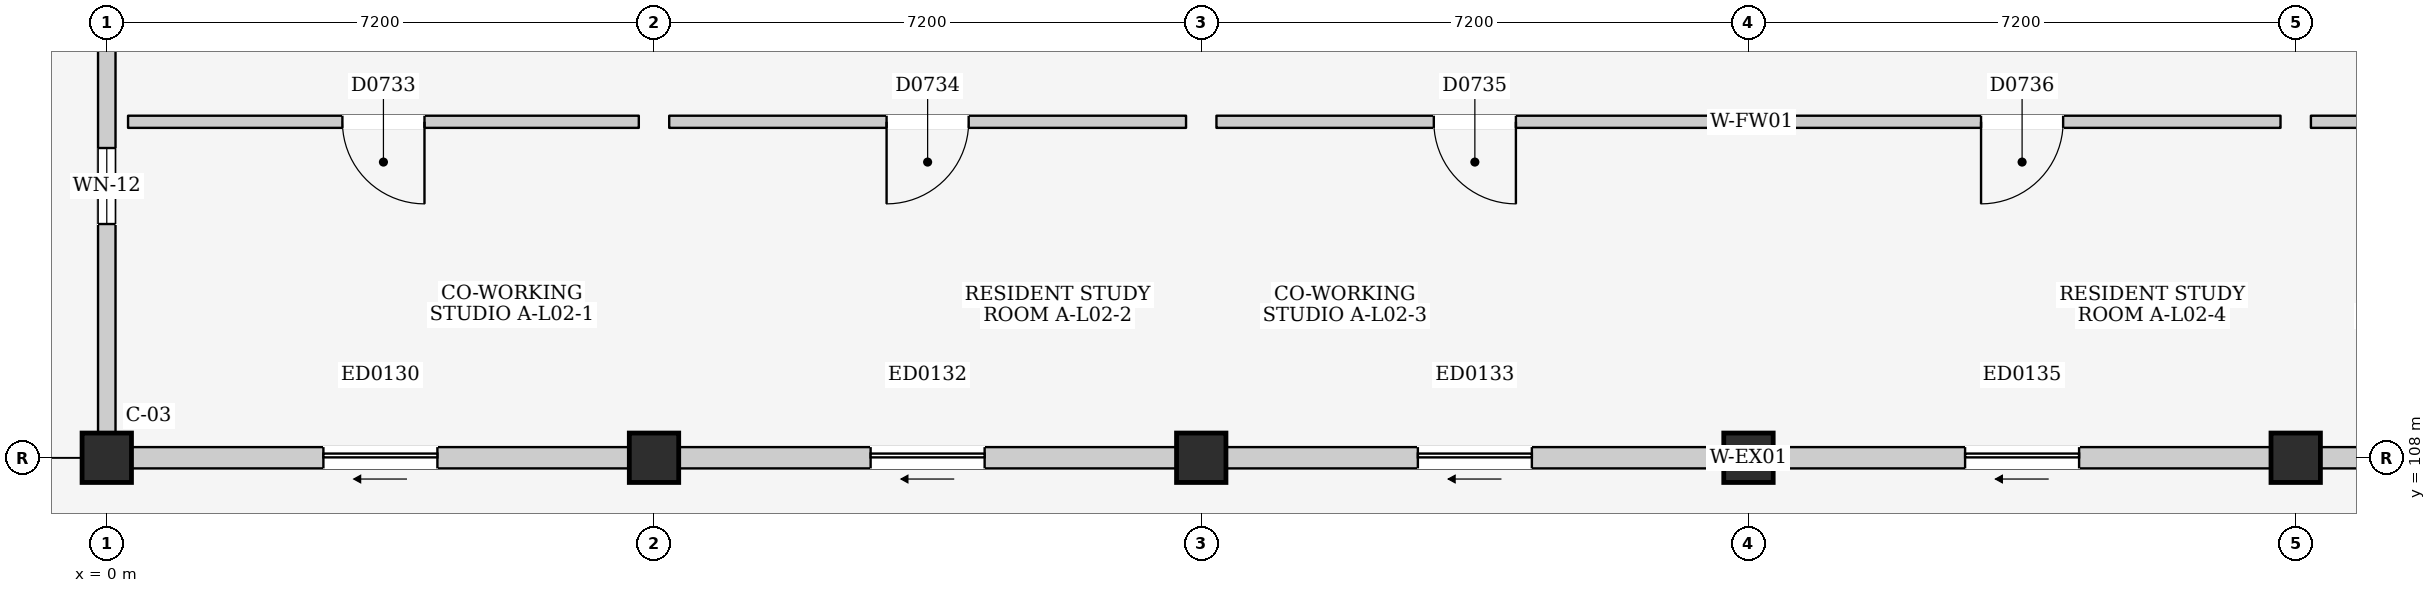
"""IFC4 building model, lengths in metres.
Left out: names, types, materials, properties, quantities, classifications, styles, units other than length and angle.
Written with IfcOpenShell. Run it as: python <this file> out.ifc"""

import sys

from ifc_helpers import new_model, si_unit, direction, frame, frame_2d, origin, origin_2d, place, context, subcontext, project, spatial, rectangle, extrude, element, fill, save


model = new_model("IFC4")
c1 = context("Model", 3, precision=1e-05, world=origin(), true_north=direction((0.0, 1.0)))
c2 = subcontext(c1, "Body", "Model", "MODEL_VIEW")
j1 = project(units=[si_unit("LENGTHUNIT", "METRE"), si_unit("PLANEANGLEUNIT", "RADIAN")], contexts=[c1])
p1 = place(None, origin())
s1 = spatial("IfcSite", under=j1, at=p1, CompositionType="ELEMENT")
p2 = place(p1, origin())
s2 = spatial("IfcBuilding", under=s1, at=p2, CompositionType="ELEMENT")
p3 = place(p2, frame((0.0, 0.0, 9.0)))
s3 = spatial("IfcBuildingStorey", under=s2, at=p3, CompositionType="ELEMENT", Elevation=9.0)
for number, where, z_axis, x_axis in (
    (1, (0.0, 108.0, 0.0), (0.0, 0.0, 1.0), (1.0, 0.0, 0.0)),
    (2, (7.2, 108.0, 0.0), (0.0, 0.0, 1.0), (1.0, 0.0, 0.0)),
    (3, (14.4, 108.0, 0.0), (0.0, 0.0, 1.0), (1.0, 0.0, 0.0)),
    (4, (21.6, 108.0, 0.0), (0.0, 0.0, 1.0), (1.0, 0.0, 0.0)),
    (5, (28.8, 108.0, 0.0), (0.0, 0.0, 1.0), (1.0, 0.0, 0.0)),
):
    element("IfcColumn", number, at=place(p3, frame(where, z_axis=z_axis, x_axis=x_axis)), inside=s3, PredefinedType="COLUMN", context=c2, shape_type="SweptSolid", body=[
        extrude(rectangle(XDim=0.65, YDim=0.65, at=origin_2d()), origin(), (0.0, 0.0, 1.0), 3.2),
    ])
p4 = place(p3, frame((0.325, 108.0, 0.0), z_axis=(0.0, 0.0, 1.0), x_axis=(1.0, 0.0, 0.0)))
e6 = element("IfcWall", 6, at=p4, inside=s3, PredefinedType="ELEMENTEDWALL", context=c2, shape_type="SweptSolid", body=[
    extrude(rectangle(XDim=6.55, YDim=0.28, at=frame_2d((3.275, 0.0))), origin(), (0.0, 0.0, 1.0), 2.295),
])
p5 = place(p4, frame((2.525, 0.0, 0.0)))
e7 = element("IfcOpeningElement", 7, at=p5, cuts=e6, PredefinedType="OPENING", context=c2, shape_type="SweptSolid", body=[
    extrude(rectangle(XDim=1.5, YDim=2.12, at=frame_2d((0.75, 1.06))), frame((0.0, 0.155, 0.0), z_axis=(0.0, -1.0, 0.0), x_axis=(1.0, 0.0, 0.0)), (0.0, 0.0, 1.0), 0.31),
])
p6 = place(p3, frame((7.525, 108.0, 0.0), z_axis=(0.0, 0.0, 1.0), x_axis=(1.0, 0.0, 0.0)))
e8 = element("IfcWall", 8, at=p6, inside=s3, PredefinedType="ELEMENTEDWALL", context=c2, shape_type="SweptSolid", body=[
    extrude(rectangle(XDim=6.55, YDim=0.28, at=frame_2d((3.275, 0.0))), origin(), (0.0, 0.0, 1.0), 2.295),
])
p7 = place(p6, frame((2.525, 0.0, 0.0)))
e9 = element("IfcOpeningElement", 9, at=p7, cuts=e8, PredefinedType="OPENING", context=c2, shape_type="SweptSolid", body=[
    extrude(rectangle(XDim=1.5, YDim=2.12, at=frame_2d((0.75, 1.06))), frame((0.0, 0.155, 0.0), z_axis=(0.0, -1.0, 0.0), x_axis=(1.0, 0.0, 0.0)), (0.0, 0.0, 1.0), 0.31),
])
p8 = place(p3, frame((14.725, 108.0, 0.0), z_axis=(0.0, 0.0, 1.0), x_axis=(1.0, 0.0, 0.0)))
e10 = element("IfcWall", 10, at=p8, inside=s3, PredefinedType="ELEMENTEDWALL", context=c2, shape_type="SweptSolid", body=[
    extrude(rectangle(XDim=6.55, YDim=0.28, at=frame_2d((3.275, 0.0))), origin(), (0.0, 0.0, 1.0), 2.295),
])
p9 = place(p8, frame((2.525, 0.0, 0.0)))
e11 = element("IfcOpeningElement", 11, at=p9, cuts=e10, PredefinedType="OPENING", context=c2, shape_type="SweptSolid", body=[
    extrude(rectangle(XDim=1.5, YDim=2.12, at=frame_2d((0.75, 1.06))), frame((0.0, 0.155, 0.0), z_axis=(0.0, -1.0, 0.0), x_axis=(1.0, 0.0, 0.0)), (0.0, 0.0, 1.0), 0.31),
])
p10 = place(p3, frame((21.925, 108.0, 0.0), z_axis=(0.0, 0.0, 1.0), x_axis=(1.0, 0.0, 0.0)))
e12 = element("IfcWall", 12, at=p10, inside=s3, PredefinedType="ELEMENTEDWALL", context=c2, shape_type="SweptSolid", body=[
    extrude(rectangle(XDim=6.55, YDim=0.28, at=frame_2d((3.275, 0.0))), origin(), (0.0, 0.0, 1.0), 2.295),
])
p11 = place(p10, frame((2.525, 0.0, 0.0)))
e13 = element("IfcOpeningElement", 13, at=p11, cuts=e12, PredefinedType="OPENING", context=c2, shape_type="SweptSolid", body=[
    extrude(rectangle(XDim=1.5, YDim=2.12, at=frame_2d((0.75, 1.06))), frame((0.0, 0.155, 0.0), z_axis=(0.0, -1.0, 0.0), x_axis=(1.0, 0.0, 0.0)), (0.0, 0.0, 1.0), 0.31),
])
p12 = place(p3, frame((29.125, 108.0, 0.0), z_axis=(0.0, 0.0, 1.0), x_axis=(1.0, 0.0, 0.0)))
e14 = element("IfcWall", 14, at=p12, inside=s3, PredefinedType="ELEMENTEDWALL", context=c2, shape_type="SweptSolid", body=[
    extrude(rectangle(XDim=6.55, YDim=0.28, at=frame_2d((3.275, 0.0))), origin(), (0.0, 0.0, 1.0), 2.295),
])
p13 = place(p12, frame((2.525, 0.0, 0.0)))
e15 = element("IfcOpeningElement", 15, at=p13, cuts=e14, PredefinedType="OPENING", context=c2, shape_type="SweptSolid", body=[
    extrude(rectangle(XDim=1.5, YDim=2.12, at=frame_2d((0.75, 1.06))), frame((0.0, 0.155, 0.0), z_axis=(0.0, -1.0, 0.0), x_axis=(1.0, 0.0, 0.0)), (0.0, 0.0, 1.0), 0.31),
])
p14 = place(p3, frame((0.0, 108.325, 0.0), z_axis=(0.0, 0.0, 1.0), x_axis=(0.0, 1.0, 0.0)))
e16 = element("IfcWall", 16, at=p14, inside=s3, PredefinedType="ELEMENTEDWALL", context=c2, shape_type="SweptSolid", body=[
    extrude(rectangle(XDim=6.55, YDim=0.23, at=frame_2d((3.275, 0.0))), origin(), (0.0, 0.0, 1.0), 2.425),
])
p15 = place(p14, frame((2.75, 0.0, 1.1)))
e17 = element("IfcOpeningElement", 17, at=p15, cuts=e16, PredefinedType="OPENING", context=c2, shape_type="SweptSolid", body=[
    extrude(rectangle(XDim=1.0, YDim=0.9, at=frame_2d((0.5, 0.45))), frame((0.0, 0.13, 0.0), z_axis=(0.0, -1.0, 0.0), x_axis=(1.0, 0.0, 0.0)), (0.0, 0.0, 1.0), 0.26),
])
p16 = place(p3, frame((0.28, 112.42, 0.0), z_axis=(0.0, 0.0, 1.0), x_axis=(1.0, 0.0, 0.0)))
e18 = element("IfcWall", 18, at=p16, inside=s3, PredefinedType="PARTITIONING", context=c2, shape_type="SweptSolid", body=[
    extrude(rectangle(XDim=6.72, YDim=0.16, at=frame_2d((3.36, 0.0))), origin(), (0.0, 0.0, 1.0), 2.96),
])
p17 = place(p16, frame((2.82, 0.0, 0.0)))
e19 = element("IfcOpeningElement", 19, at=p17, cuts=e18, PredefinedType="OPENING", context=c2, shape_type="SweptSolid", body=[
    extrude(rectangle(XDim=1.08, YDim=2.22, at=frame_2d((0.54, 1.11))), frame((0.0, 0.095, 0.0), z_axis=(0.0, -1.0, 0.0), x_axis=(1.0, 0.0, 0.0)), (0.0, 0.0, 1.0), 0.19),
])
p18 = place(p3, frame((7.4, 112.42, 0.0), z_axis=(0.0, 0.0, 1.0), x_axis=(1.0, 0.0, 0.0)))
e20 = element("IfcWall", 20, at=p18, inside=s3, PredefinedType="PARTITIONING", context=c2, shape_type="SweptSolid", body=[
    extrude(rectangle(XDim=6.8, YDim=0.16, at=frame_2d((3.4, 0.0))), origin(), (0.0, 0.0, 1.0), 2.96),
])
p19 = place(p18, frame((2.86, 0.0, 0.0)))
e21 = element("IfcOpeningElement", 21, at=p19, cuts=e20, PredefinedType="OPENING", context=c2, shape_type="SweptSolid", body=[
    extrude(rectangle(XDim=1.08, YDim=2.22, at=frame_2d((0.54, 1.11))), frame((0.0, 0.095, 0.0), z_axis=(0.0, -1.0, 0.0), x_axis=(1.0, 0.0, 0.0)), (0.0, 0.0, 1.0), 0.19),
])
p20 = place(p3, frame((14.6, 112.42, 0.0), z_axis=(0.0, 0.0, 1.0), x_axis=(1.0, 0.0, 0.0)))
e22 = element("IfcWall", 22, at=p20, inside=s3, PredefinedType="PARTITIONING", context=c2, shape_type="SweptSolid", body=[
    extrude(rectangle(XDim=6.8, YDim=0.16, at=frame_2d((3.4, 0.0))), origin(), (0.0, 0.0, 1.0), 2.96),
])
p21 = place(p20, frame((2.86, 0.0, 0.0)))
e23 = element("IfcOpeningElement", 23, at=p21, cuts=e22, PredefinedType="OPENING", context=c2, shape_type="SweptSolid", body=[
    extrude(rectangle(XDim=1.08, YDim=2.22, at=frame_2d((0.54, 1.11))), frame((0.0, 0.095, 0.0), z_axis=(0.0, -1.0, 0.0), x_axis=(1.0, 0.0, 0.0)), (0.0, 0.0, 1.0), 0.19),
])
p22 = place(p3, frame((21.8, 112.42, 0.0), z_axis=(0.0, 0.0, 1.0), x_axis=(1.0, 0.0, 0.0)))
e24 = element("IfcWall", 24, at=p22, inside=s3, PredefinedType="PARTITIONING", context=c2, shape_type="SweptSolid", body=[
    extrude(rectangle(XDim=6.8, YDim=0.16, at=frame_2d((3.4, 0.0))), origin(), (0.0, 0.0, 1.0), 2.96),
])
p23 = place(p22, frame((2.86, 0.0, 0.0)))
e25 = element("IfcOpeningElement", 25, at=p23, cuts=e24, PredefinedType="OPENING", context=c2, shape_type="SweptSolid", body=[
    extrude(rectangle(XDim=1.08, YDim=2.22, at=frame_2d((0.54, 1.11))), frame((0.0, 0.095, 0.0), z_axis=(0.0, -1.0, 0.0), x_axis=(1.0, 0.0, 0.0)), (0.0, 0.0, 1.0), 0.19),
])
p24 = place(p3, frame((29.0, 112.42, 0.0), z_axis=(0.0, 0.0, 1.0), x_axis=(1.0, 0.0, 0.0)))
e26 = element("IfcWall", 26, at=p24, inside=s3, PredefinedType="PARTITIONING", context=c2, shape_type="SweptSolid", body=[
    extrude(rectangle(XDim=6.8, YDim=0.16, at=frame_2d((3.4, 0.0))), origin(), (0.0, 0.0, 1.0), 2.96),
])
p25 = place(p24, frame((2.86, 0.0, 0.0)))
e27 = element("IfcOpeningElement", 27, at=p25, cuts=e26, PredefinedType="OPENING", context=c2, shape_type="SweptSolid", body=[
    extrude(rectangle(XDim=1.08, YDim=2.22, at=frame_2d((0.54, 1.11))), frame((0.0, 0.095, 0.0), z_axis=(0.0, -1.0, 0.0), x_axis=(1.0, 0.0, 0.0)), (0.0, 0.0, 1.0), 0.19),
])
p26 = place(p5, frame((1.5, 0.0, 0.0), z_axis=(0.0, 0.0, 1.0), x_axis=(-1.0, 0.0, 0.0)))
e28 = element("IfcDoor", 28, at=p26, inside=s3, OperationType="SLIDING_TO_LEFT", PredefinedType="DOOR", context=c2, shape_type="SweptSolid", body=[
    extrude(rectangle(XDim=1.5, YDim=2.12, at=frame_2d((0.75, 1.06))), frame((0.0, 0.025, 0.0), z_axis=(0.0, -1.0, 0.0), x_axis=(1.0, 0.0, 0.0)), (0.0, 0.0, 1.0), 0.05),
])
fill(e7, e28)
p27 = place(p7, frame((1.5, 0.0, 0.0), z_axis=(0.0, 0.0, 1.0), x_axis=(-1.0, 0.0, 0.0)))
e29 = element("IfcDoor", 29, at=p27, inside=s3, OperationType="SLIDING_TO_LEFT", PredefinedType="DOOR", context=c2, shape_type="SweptSolid", body=[
    extrude(rectangle(XDim=1.5, YDim=2.12, at=frame_2d((0.75, 1.06))), frame((0.0, 0.025, 0.0), z_axis=(0.0, -1.0, 0.0), x_axis=(1.0, 0.0, 0.0)), (0.0, 0.0, 1.0), 0.05),
])
fill(e9, e29)
p28 = place(p9, frame((1.5, 0.0, 0.0), z_axis=(0.0, 0.0, 1.0), x_axis=(-1.0, 0.0, 0.0)))
e30 = element("IfcDoor", 30, at=p28, inside=s3, OperationType="SLIDING_TO_LEFT", PredefinedType="DOOR", context=c2, shape_type="SweptSolid", body=[
    extrude(rectangle(XDim=1.5, YDim=2.12, at=frame_2d((0.75, 1.06))), frame((0.0, 0.025, 0.0), z_axis=(0.0, -1.0, 0.0), x_axis=(1.0, 0.0, 0.0)), (0.0, 0.0, 1.0), 0.05),
])
fill(e11, e30)
p29 = place(p11, frame((1.5, 0.0, 0.0), z_axis=(0.0, 0.0, 1.0), x_axis=(-1.0, 0.0, 0.0)))
e31 = element("IfcDoor", 31, at=p29, inside=s3, OperationType="SLIDING_TO_LEFT", PredefinedType="DOOR", context=c2, shape_type="SweptSolid", body=[
    extrude(rectangle(XDim=1.5, YDim=2.12, at=frame_2d((0.75, 1.06))), frame((0.0, 0.025, 0.0), z_axis=(0.0, -1.0, 0.0), x_axis=(1.0, 0.0, 0.0)), (0.0, 0.0, 1.0), 0.05),
])
fill(e13, e31)
p30 = place(p15, origin())
e32 = element("IfcWindow", 32, at=p30, inside=s3, PartitioningType="SINGLE_PANEL", PredefinedType="WINDOW", context=c2, shape_type="SweptSolid", body=[
    extrude(rectangle(XDim=1.0, YDim=0.9, at=frame_2d((0.5, 0.45))), frame((0.0, 0.03, 0.0), z_axis=(0.0, -1.0, 0.0), x_axis=(1.0, 0.0, 0.0)), (0.0, 0.0, 1.0), 0.06),
])
fill(e17, e32)
p31 = place(p17, frame((1.08, 0.0, 0.0), z_axis=(0.0, 0.0, 1.0), x_axis=(-1.0, 0.0, 0.0)))
e33 = element("IfcDoor", 33, at=p31, inside=s3, OperationType="SINGLE_SWING_LEFT", PredefinedType="DOOR", context=c2, shape_type="SweptSolid", body=[
    extrude(rectangle(XDim=1.08, YDim=2.22, at=frame_2d((0.54, 1.11))), frame((0.0, 0.025, 0.0), z_axis=(0.0, -1.0, 0.0), x_axis=(1.0, 0.0, 0.0)), (0.0, 0.0, 1.0), 0.05),
])
fill(e19, e33)
p32 = place(p19, frame((1.08, 0.0, 0.0), z_axis=(0.0, 0.0, 1.0), x_axis=(-1.0, 0.0, 0.0)))
e34 = element("IfcDoor", 34, at=p32, inside=s3, OperationType="SINGLE_SWING_RIGHT", PredefinedType="DOOR", context=c2, shape_type="SweptSolid", body=[
    extrude(rectangle(XDim=1.08, YDim=2.22, at=frame_2d((0.54, 1.11))), frame((0.0, 0.025, 0.0), z_axis=(0.0, -1.0, 0.0), x_axis=(1.0, 0.0, 0.0)), (0.0, 0.0, 1.0), 0.05),
])
fill(e21, e34)
p33 = place(p21, frame((1.08, 0.0, 0.0), z_axis=(0.0, 0.0, 1.0), x_axis=(-1.0, 0.0, 0.0)))
e35 = element("IfcDoor", 35, at=p33, inside=s3, OperationType="SINGLE_SWING_LEFT", PredefinedType="DOOR", context=c2, shape_type="SweptSolid", body=[
    extrude(rectangle(XDim=1.08, YDim=2.22, at=frame_2d((0.54, 1.11))), frame((0.0, 0.025, 0.0), z_axis=(0.0, -1.0, 0.0), x_axis=(1.0, 0.0, 0.0)), (0.0, 0.0, 1.0), 0.05),
])
fill(e23, e35)
p34 = place(p23, frame((1.08, 0.0, 0.0), z_axis=(0.0, 0.0, 1.0), x_axis=(-1.0, 0.0, 0.0)))
e36 = element("IfcDoor", 36, at=p34, inside=s3, OperationType="SINGLE_SWING_RIGHT", PredefinedType="DOOR", context=c2, shape_type="SweptSolid", body=[
    extrude(rectangle(XDim=1.08, YDim=2.22, at=frame_2d((0.54, 1.11))), frame((0.0, 0.025, 0.0), z_axis=(0.0, -1.0, 0.0), x_axis=(1.0, 0.0, 0.0)), (0.0, 0.0, 1.0), 0.05),
])
fill(e25, e36)
save(model, sys.argv[1])
